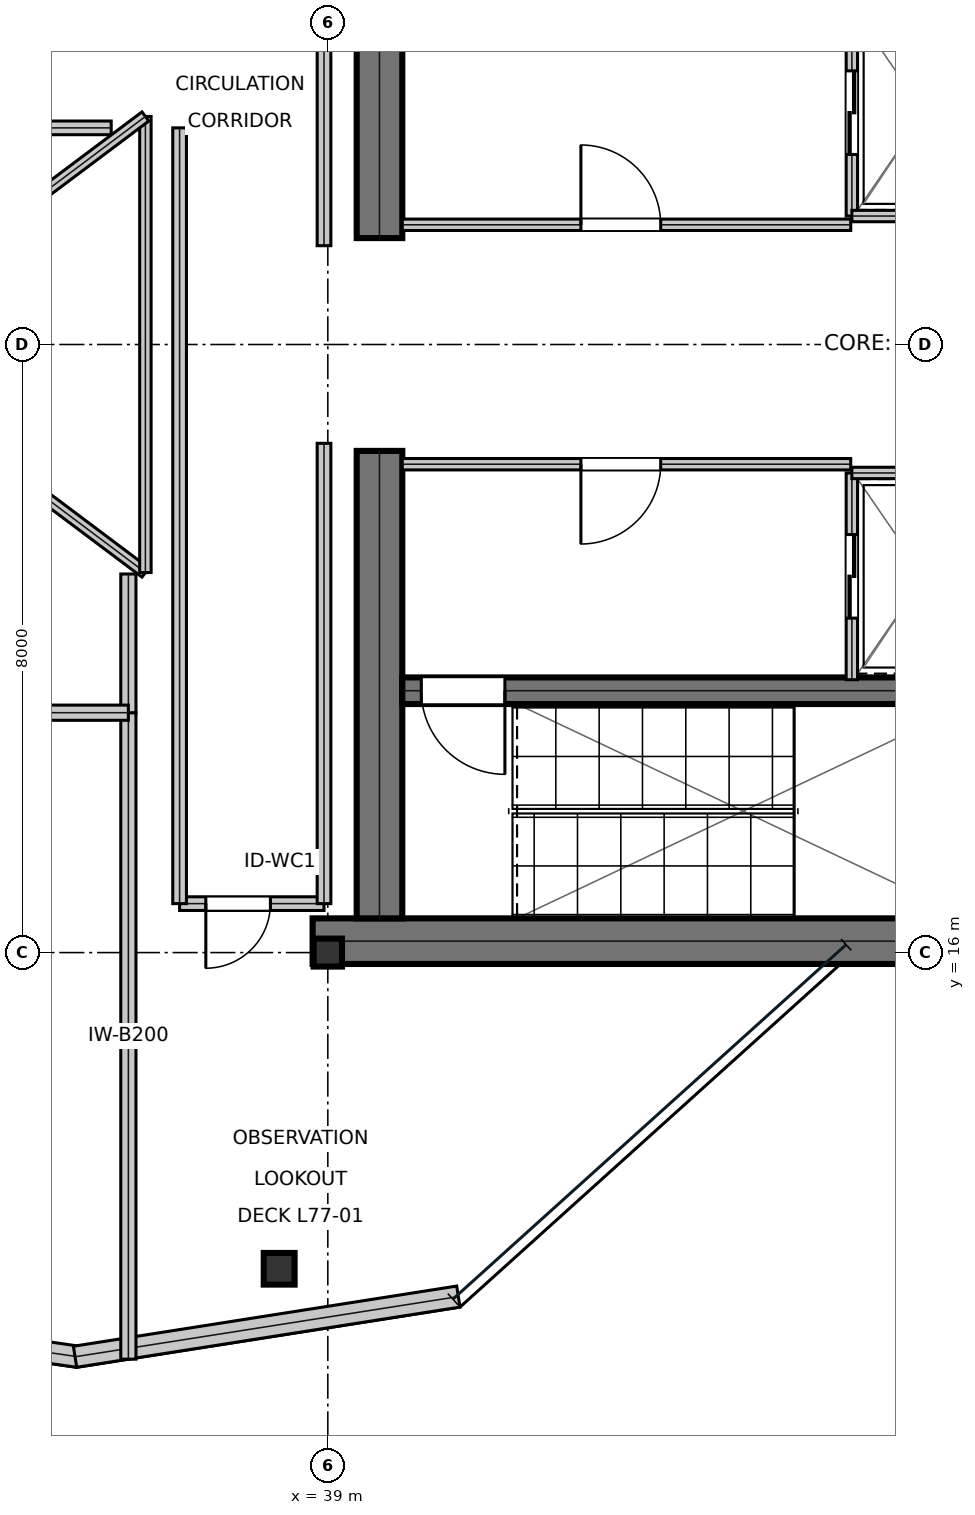
"""IFC4 building model, lengths in metres.
Left out: names, types, materials, properties, quantities, classifications, styles, units other than length and angle.
Written with IfcOpenShell. Run it as: python <this file> out.ifc"""

import sys

from ifc_helpers import new_model, si_unit, direction, frame, frame_2d, origin, origin_2d, place, context, subcontext, project, spatial, rectangle, i_section, extrude, element, fill, save


model = new_model("IFC4")
c1 = context("Model", 3, precision=1e-05, world=origin(), true_north=direction((0.0, 1.0)))
c2 = subcontext(c1, "Body", "Model", "MODEL_VIEW")
j1 = project(units=[si_unit("LENGTHUNIT", "METRE"), si_unit("PLANEANGLEUNIT", "RADIAN")], contexts=[c1])
p1 = place(None, origin())
s1 = spatial("IfcSite", under=j1, at=p1, CompositionType="ELEMENT")
p2 = place(p1, origin())
s2 = spatial("IfcBuilding", under=s1, at=p2, CompositionType="ELEMENT")
p3 = place(p2, frame((0.0, 0.0, 327.6)))
s3 = spatial("IfcBuildingStorey", under=s2, at=p3, CompositionType="ELEMENT", Elevation=327.6)
p4 = place(p3, frame((38.8, 16.15, 0.0), z_axis=(0.0, 0.0, 1.0), x_axis=(1.0, 0.0, 0.0)))
e1 = element("IfcWall", 1, at=p4, inside=s3, PredefinedType="SHEAR", context=c2, shape_type="SweptSolid", body=[
    extrude(rectangle(XDim=16.0, YDim=0.6, at=frame_2d((8.0, 0.0))), origin(), (0.0, 0.0, 1.0), 4.48),
])
for number, where, z_axis, x_axis in (
    (2, (39.68, 16.45, 0.0), (0.0, 0.0, 1.0), (0.0, 1.0, 0.0)),
    (3, (39.68, 25.4, 0.0), (0.0, 0.0, 1.0), (0.0, 1.0, 0.0)),
):
    element("IfcWall", number, at=place(p3, frame(where, z_axis=z_axis, x_axis=x_axis)), inside=s3, PredefinedType="SHEAR", context=c2, shape_type="SweptSolid", body=[
        extrude(rectangle(XDim=6.15, YDim=0.6, at=frame_2d((3.075, 0.0))), origin(), (0.0, 0.0, 1.0), 4.48),
    ])
p5 = place(p3, frame((39.98, 19.445, 0.0), z_axis=(0.0, 0.0, 1.0), x_axis=(1.0, 0.0, 0.0)))
e4 = element("IfcWall", 4, at=p5, inside=s3, PredefinedType="SHEAR", context=c2, shape_type="SweptSolid", body=[
    extrude(rectangle(XDim=7.71, YDim=0.35, at=frame_2d((3.855, 0.0))), origin(), (0.0, 0.0, 1.0), 4.48),
])
p6 = place(p5, frame((0.25, 0.0, 0.0)))
e5 = element("IfcOpeningElement", 5, at=p6, cuts=e4, PredefinedType="OPENING", context=c2, shape_type="SweptSolid", body=[
    extrude(rectangle(XDim=1.1, YDim=2.15, at=frame_2d((0.55, 1.075))), frame((0.0, 0.185, 0.0), z_axis=(0.0, -1.0, 0.0), x_axis=(1.0, 0.0, 0.0)), (0.0, 0.0, 1.0), 0.37),
])
p7 = place(p3, frame((39.0, 16.0, 0.0), z_axis=(0.0, 0.0, 1.0), x_axis=(1.0, 0.0, 0.0)))
e6 = element("IfcColumn", 6, at=p7, inside=s3, PredefinedType="COLUMN", context=c2, shape_type="SweptSolid", body=[
    extrude(i_section(OverallWidth=0.373, OverallDepth=0.368, WebThickness=0.015, FlangeThickness=0.024, at=origin_2d()), origin(), (0.0, 0.0, 1.0), 4.794),
])
p8 = place(p3, frame((38.36, 11.84, 0.016), z_axis=(-0.008386425787, 0.050267417979, 0.998700583034), x_axis=(-0.986366790816, -0.164561702639, 0.0)))
e7 = element("IfcColumn", 7, at=p8, inside=s3, PredefinedType="COLUMN", context=c2, shape_type="SweptSolid", body=[
    extrude(i_section(OverallWidth=0.406, OverallDepth=0.416, WebThickness=0.03, FlangeThickness=0.048, at=origin_2d()), origin(), (0.0, 0.0, 1.0), 4.774),
])
p9 = place(p3, frame((30.673, 11.403, 0.0), z_axis=(0.0, 0.0, 1.0), x_axis=(0.989962907882, -0.141327424861, 0.0)))
e8 = element("IfcWall", 8, at=p9, inside=s3, PredefinedType="STANDARD", context=c2, shape_type="SweptSolid", body=[
    extrude(rectangle(XDim=5.094, YDim=0.28, at=frame_2d((2.547, 0.0))), origin(), (0.0, 0.0, 1.0), 4.48),
])
p10 = place(p3, frame((35.674, 10.682, 0.0), z_axis=(0.0, 0.0, 1.0), x_axis=(0.987892522015, 0.155139823857, 0.0)))
e9 = element("IfcWall", 9, at=p10, inside=s3, PredefinedType="STANDARD", context=c2, shape_type="SweptSolid", body=[
    extrude(rectangle(XDim=5.105, YDim=0.28, at=frame_2d((2.552, 0.0))), origin(), (0.0, 0.0, 1.0), 4.48),
])
p11 = place(p3, frame((39.98, 25.575, 0.0), z_axis=(0.0, 0.0, 1.0), x_axis=(1.0, 0.0, 0.0)))
e10 = element("IfcWall", 10, at=p11, inside=s3, PredefinedType="PARTITIONING", context=c2, shape_type="SweptSolid", body=[
    extrude(rectangle(XDim=5.9, YDim=0.15, at=frame_2d((2.95, 0.0))), origin(), (0.0, 0.0, 1.0), 4.48),
])
p12 = place(p11, frame((2.35, 0.0, 0.0)))
e11 = element("IfcOpeningElement", 11, at=p12, cuts=e10, PredefinedType="OPENING", context=c2, shape_type="SweptSolid", body=[
    extrude(rectangle(XDim=1.05, YDim=2.15, at=frame_2d((0.525, 1.075))), frame((0.0, 0.085, 0.0), z_axis=(0.0, -1.0, 0.0), x_axis=(1.0, 0.0, 0.0)), (0.0, 0.0, 1.0), 0.17),
])
p13 = place(p3, frame((39.98, 22.425, 0.0), z_axis=(0.0, 0.0, 1.0), x_axis=(1.0, 0.0, 0.0)))
e12 = element("IfcWall", 12, at=p13, inside=s3, PredefinedType="PARTITIONING", context=c2, shape_type="SweptSolid", body=[
    extrude(rectangle(XDim=5.9, YDim=0.15, at=frame_2d((2.95, 0.0))), origin(), (0.0, 0.0, 1.0), 4.48),
])
p14 = place(p13, frame((2.35, 0.0, 0.0)))
e13 = element("IfcOpeningElement", 13, at=p14, cuts=e12, PredefinedType="OPENING", context=c2, shape_type="SweptSolid", body=[
    extrude(rectangle(XDim=1.05, YDim=2.15, at=frame_2d((0.525, 1.075))), frame((0.0, 0.085, 0.0), z_axis=(0.0, -1.0, 0.0), x_axis=(1.0, 0.0, 0.0)), (0.0, 0.0, 1.0), 0.17),
])
p15 = place(p3, frame((45.895, 25.69, 0.0), z_axis=(0.0, 0.0, 1.0), x_axis=(0.0, 1.0, 0.0)))
e14 = element("IfcWall", 14, at=p15, inside=s3, PredefinedType="PARTITIONING", context=c2, shape_type="SweptSolid", body=[
    extrude(rectangle(XDim=2.72, YDim=0.15, at=frame_2d((1.36, 0.0))), origin(), (0.0, 0.0, 1.0), 4.48),
])
p16 = place(p15, frame((0.81, 0.0, 0.0)))
e15 = element("IfcOpeningElement", 15, at=p16, cuts=e14, PredefinedType="OPENING", context=c2, shape_type="SweptSolid", body=[
    extrude(rectangle(XDim=1.1, YDim=2.15, at=frame_2d((0.55, 1.075))), frame((0.0, 0.085, 0.0), z_axis=(0.0, -1.0, 0.0), x_axis=(1.0, 0.0, 0.0)), (0.0, 0.0, 1.0), 0.17),
])
p17 = place(p3, frame((45.895, 25.69, 0.0), z_axis=(0.0, 0.0, 1.0), x_axis=(1.0, 0.0, 0.0)))
e16 = element("IfcWall", 16, at=p17, inside=s3, PredefinedType="PARTITIONING", context=c2, shape_type="SweptSolid", body=[
    extrude(rectangle(XDim=1.915, YDim=0.15, at=frame_2d((0.958, 0.0))), origin(), (0.0, 0.0, 1.0), 4.48),
])
p18 = place(p3, frame((45.895, 19.59, 0.0), z_axis=(0.0, 0.0, 1.0), x_axis=(0.0, 1.0, 0.0)))
e17 = element("IfcWall", 17, at=p18, inside=s3, PredefinedType="PARTITIONING", context=c2, shape_type="SweptSolid", body=[
    extrude(rectangle(XDim=2.72, YDim=0.15, at=frame_2d((1.36, 0.0))), origin(), (0.0, 0.0, 1.0), 4.48),
])
p19 = place(p18, frame((0.81, 0.0, 0.0)))
e18 = element("IfcOpeningElement", 18, at=p19, cuts=e17, PredefinedType="OPENING", context=c2, shape_type="SweptSolid", body=[
    extrude(rectangle(XDim=1.1, YDim=2.15, at=frame_2d((0.55, 1.075))), frame((0.0, 0.085, 0.0), z_axis=(0.0, -1.0, 0.0), x_axis=(1.0, 0.0, 0.0)), (0.0, 0.0, 1.0), 0.17),
])
p20 = place(p3, frame((45.895, 22.31, 0.0), z_axis=(0.0, 0.0, 1.0), x_axis=(1.0, 0.0, 0.0)))
e19 = element("IfcWall", 19, at=p20, inside=s3, PredefinedType="PARTITIONING", context=c2, shape_type="SweptSolid", body=[
    extrude(rectangle(XDim=1.915, YDim=0.15, at=frame_2d((0.958, 0.0))), origin(), (0.0, 0.0, 1.0), 4.48),
])
p21 = place(p3, frame((37.05, 16.644, 0.0), z_axis=(0.0, 0.0, 1.0), x_axis=(1.0, 0.0, 0.0)))
e20 = element("IfcWall", 20, at=p21, inside=s3, PredefinedType="SOLIDWALL", context=c2, shape_type="SweptSolid", body=[
    extrude(rectangle(XDim=1.9, YDim=0.18, at=frame_2d((0.95, 0.0))), origin(), (0.0, 0.0, 1.0), 4.48),
])
p22 = place(p21, frame((0.345, 0.0, 0.0)))
e21 = element("IfcOpeningElement", 21, at=p22, cuts=e20, PredefinedType="OPENING", context=c2, shape_type="SweptSolid", body=[
    extrude(rectangle(XDim=0.85, YDim=2.15, at=frame_2d((0.425, 1.075))), frame((0.0, 0.1, 0.0), z_axis=(0.0, -1.0, 0.0), x_axis=(1.0, 0.0, 0.0)), (0.0, 0.0, 1.0), 0.2),
])
p23 = place(p3, frame((37.05, 16.644, 0.0), z_axis=(0.0, 0.0, 1.0), x_axis=(0.0, 1.0, 0.0)))
e22 = element("IfcWall", 22, at=p23, inside=s3, PredefinedType="SOLIDWALL", context=c2, shape_type="SweptSolid", body=[
    extrude(rectangle(XDim=10.206, YDim=0.18, at=frame_2d((5.103, 0.0))), origin(), (0.0, 0.0, 1.0), 4.21),
])
p24 = place(p3, frame((38.95, 16.644, 0.0), z_axis=(0.0, 0.0, 1.0), x_axis=(0.0, 1.0, 0.0)))
e23 = element("IfcWall", 23, at=p24, inside=s3, PredefinedType="SOLIDWALL", context=c2, shape_type="SweptSolid", body=[
    extrude(rectangle(XDim=6.056, YDim=0.18, at=frame_2d((3.028, 0.0))), origin(), (0.0, 0.0, 1.0), 4.21),
])
p25 = place(p3, frame((30.25, 26.85, 0.0), z_axis=(0.0, 0.0, 1.0), x_axis=(1.0, 0.0, 0.0)))
e24 = element("IfcWall", 24, at=p25, inside=s3, PredefinedType="SOLIDWALL", context=c2, shape_type="SweptSolid", body=[
    extrude(rectangle(XDim=5.9, YDim=0.18, at=frame_2d((2.95, 0.0))), origin(), (0.0, 0.0, 1.0), 3.94),
])
p26 = place(p3, frame((38.95, 25.3, 0.0), z_axis=(0.0, 0.0, 1.0), x_axis=(0.0, 1.0, 0.0)))
e25 = element("IfcWall", 25, at=p26, inside=s3, PredefinedType="SOLIDWALL", context=c2, shape_type="SweptSolid", body=[
    extrude(rectangle(XDim=6.056, YDim=0.18, at=frame_2d((3.028, 0.0))), origin(), (0.0, 0.0, 1.0), 4.21),
])
p27 = place(p3, frame((36.376, 10.651, 0.0), z_axis=(0.0, 0.0, 1.0), x_axis=(0.0, 1.0, 0.0)))
e26 = element("IfcWall", 26, at=p27, inside=s3, PredefinedType="SOLIDWALL", context=c2, shape_type="SweptSolid", body=[
    extrude(rectangle(XDim=8.505, YDim=0.2, at=frame_2d((4.252, 0.0))), origin(), (0.0, 0.0, 1.0), 3.94),
])
p28 = place(p3, frame((36.376, 19.156, 0.0), z_axis=(0.0, 0.0, 1.0), x_axis=(0.0, 1.0, 0.0)))
e27 = element("IfcWall", 27, at=p28, inside=s3, PredefinedType="SOLIDWALL", context=c2, shape_type="SweptSolid", body=[
    extrude(rectangle(XDim=1.824, YDim=0.2, at=frame_2d((0.912, 0.0))), origin(), (0.0, 0.0, 1.0), 4.21),
])
p29 = place(p3, frame((30.25, 19.156, 0.0), z_axis=(0.0, 0.0, 1.0), x_axis=(1.0, 0.0, 0.0)))
e28 = element("IfcWall", 28, at=p29, inside=s3, PredefinedType="SOLIDWALL", context=c2, shape_type="SweptSolid", body=[
    extrude(rectangle(XDim=6.126, YDim=0.2, at=frame_2d((3.063, 0.0))), origin(), (0.0, 0.0, 1.0), 3.94),
])
p30 = place(p3, frame((32.6, 24.0, 0.0), z_axis=(0.0, 0.0, 1.0), x_axis=(0.8, -0.6, 0.0)))
e29 = element("IfcWall", 29, at=p30, inside=s3, PredefinedType="MOVABLE", context=c2, shape_type="SweptSolid", body=[
    extrude(rectangle(XDim=5.0, YDim=0.15, at=frame_2d((2.5, 0.0))), origin(), (0.0, 0.0, 1.0), 4.48),
])
p31 = place(p3, frame((36.6, 21.0, 0.0), z_axis=(0.0, 0.0, 1.0), x_axis=(0.0, 1.0, 0.0)))
e30 = element("IfcWall", 30, at=p31, inside=s3, PredefinedType="MOVABLE", context=c2, shape_type="SweptSolid", body=[
    extrude(rectangle(XDim=6.0, YDim=0.15, at=frame_2d((3.0, 0.0))), origin(), (0.0, 0.0, 1.0), 4.48),
])
p32 = place(p3, frame((36.6, 27.0, 0.0), z_axis=(0.0, 0.0, 1.0), x_axis=(-0.8, -0.6, 0.0)))
e31 = element("IfcWall", 31, at=p32, inside=s3, PredefinedType="MOVABLE", context=c2, shape_type="SweptSolid", body=[
    extrude(rectangle(XDim=5.0, YDim=0.15, at=frame_2d((2.5, 0.0))), origin(), (0.0, 0.0, 1.0), 4.48),
])
p33 = place(p12, origin())
e32 = element("IfcDoor", 32, at=p33, inside=s3, OperationType="SINGLE_SWING_LEFT", PredefinedType="DOOR", context=c2, shape_type="SweptSolid", body=[
    extrude(rectangle(XDim=1.05, YDim=2.15, at=frame_2d((0.525, 1.075))), frame((0.0, 0.025, 0.0), z_axis=(0.0, -1.0, 0.0), x_axis=(1.0, 0.0, 0.0)), (0.0, 0.0, 1.0), 0.05),
])
fill(e11, e32)
p34 = place(p14, frame((1.05, 0.0, 0.0), z_axis=(0.0, 0.0, 1.0), x_axis=(-1.0, 0.0, 0.0)))
e33 = element("IfcDoor", 33, at=p34, inside=s3, OperationType="SINGLE_SWING_RIGHT", PredefinedType="DOOR", context=c2, shape_type="SweptSolid", body=[
    extrude(rectangle(XDim=1.05, YDim=2.15, at=frame_2d((0.525, 1.075))), frame((0.0, 0.025, 0.0), z_axis=(0.0, -1.0, 0.0), x_axis=(1.0, 0.0, 0.0)), (0.0, 0.0, 1.0), 0.05),
])
fill(e13, e33)
p35 = place(p16, frame((1.1, 0.0, 0.0), z_axis=(0.0, 0.0, 1.0), x_axis=(-1.0, 0.0, 0.0)))
e34 = element("IfcDoor", 34, at=p35, inside=s3, OperationType="DOUBLE_DOOR_SLIDING", PredefinedType="DOOR", context=c2, shape_type="SweptSolid", body=[
    extrude(rectangle(XDim=1.1, YDim=2.15, at=frame_2d((0.55, 1.075))), frame((0.0, 0.025, 0.0), z_axis=(0.0, -1.0, 0.0), x_axis=(1.0, 0.0, 0.0)), (0.0, 0.0, 1.0), 0.05),
])
fill(e15, e34)
p36 = place(p19, frame((1.1, 0.0, 0.0), z_axis=(0.0, 0.0, 1.0), x_axis=(-1.0, 0.0, 0.0)))
e35 = element("IfcDoor", 35, at=p36, inside=s3, OperationType="DOUBLE_DOOR_SLIDING", PredefinedType="DOOR", context=c2, shape_type="SweptSolid", body=[
    extrude(rectangle(XDim=1.1, YDim=2.15, at=frame_2d((0.55, 1.075))), frame((0.0, 0.025, 0.0), z_axis=(0.0, -1.0, 0.0), x_axis=(1.0, 0.0, 0.0)), (0.0, 0.0, 1.0), 0.05),
])
fill(e18, e35)
p37 = place(p22, frame((0.85, 0.0, 0.0), z_axis=(0.0, 0.0, 1.0), x_axis=(-1.0, 0.0, 0.0)))
e36 = element("IfcDoor", 36, at=p37, inside=s3, OperationType="SINGLE_SWING_RIGHT", PredefinedType="DOOR", context=c2, shape_type="SweptSolid", body=[
    extrude(rectangle(XDim=0.85, YDim=2.15, at=frame_2d((0.425, 1.075))), frame((0.0, 0.025, 0.0), z_axis=(0.0, -1.0, 0.0), x_axis=(1.0, 0.0, 0.0)), (0.0, 0.0, 1.0), 0.05),
])
fill(e21, e36)
p38 = place(p6, frame((1.1, 0.0, 0.0), z_axis=(0.0, 0.0, 1.0), x_axis=(-1.0, 0.0, 0.0)))
e37 = element("IfcDoor", 37, at=p38, inside=s3, OperationType="SINGLE_SWING_LEFT", PredefinedType="DOOR", context=c2, shape_type="SweptSolid", body=[
    extrude(rectangle(XDim=1.1, YDim=2.15, at=frame_2d((0.55, 1.075))), frame((0.0, 0.025, 0.0), z_axis=(0.0, -1.0, 0.0), x_axis=(1.0, 0.0, 0.0)), (0.0, 0.0, 1.0), 0.05),
])
fill(e5, e37)
save(model, sys.argv[1])
